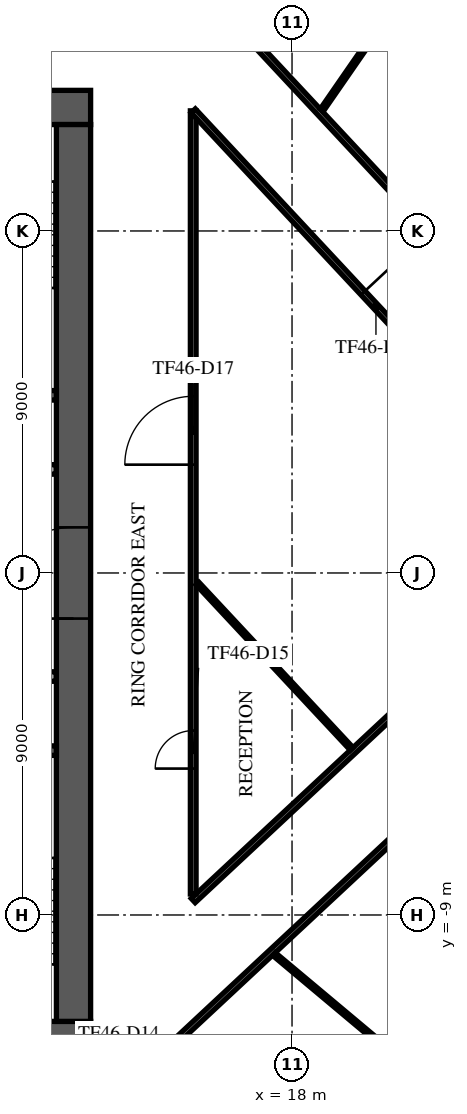
"""IFC4 building model, lengths in metres.
Left out: names, types, materials, properties, quantities, classifications, styles, units other than length and angle.
Written with IfcOpenShell. Run it as: python <this file> out.ifc"""

import sys

from ifc_helpers import new_model, si_unit, direction, frame, frame_2d, origin, place, context, subcontext, project, spatial, rectangle, extrude, element, fill, save


model = new_model("IFC4")
c1 = context("Model", 3, precision=1e-05, world=origin(), true_north=direction((0.0, 1.0)))
c2 = subcontext(c1, "Body", "Model", "MODEL_VIEW")
j1 = project(units=[si_unit("LENGTHUNIT", "METRE"), si_unit("PLANEANGLEUNIT", "RADIAN")], contexts=[c1])
p1 = place(None, origin())
s1 = spatial("IfcSite", under=j1, at=p1, CompositionType="ELEMENT")
p2 = place(p1, origin())
s2 = spatial("IfcBuilding", under=s1, at=p2, CompositionType="ELEMENT")
p3 = place(p2, frame((0.0, 0.0, 197.3)))
s3 = spatial("IfcBuildingStorey", under=s2, at=p3, CompositionType="ELEMENT", Elevation=197.3)
p4 = place(p3, frame((-12.7, 12.25, 0.0), z_axis=(0.0, 0.0, 1.0), x_axis=(1.0, 0.0, 0.0)))
e1 = element("IfcWall", 1, at=p4, inside=s3, PredefinedType="SHEAR", context=c2, shape_type="SweptSolid", body=[
    extrude(rectangle(XDim=25.4, YDim=0.9, at=frame_2d((12.7, 0.0))), origin(), (0.0, 0.0, 1.0), 3.62),
])
p5 = place(p4, frame((11.5, 0.0, 0.0)))
e2 = element("IfcOpeningElement", 2, at=p5, cuts=e1, PredefinedType="OPENING", context=c2, shape_type="SweptSolid", body=[
    extrude(rectangle(XDim=2.4, YDim=2.4, at=frame_2d((1.2, 1.2))), frame((0.0, 0.46, 0.0), z_axis=(0.0, -1.0, 0.0), x_axis=(1.0, 0.0, 0.0)), (0.0, 0.0, 1.0), 0.92),
])
p6 = place(p4, frame((22.325, 0.0, 0.0)))
e3 = element("IfcOpeningElement", 3, at=p6, cuts=e1, PredefinedType="OPENING", context=c2, shape_type="SweptSolid", body=[
    extrude(rectangle(XDim=1.2, YDim=2.1, at=frame_2d((0.6, 1.05))), frame((0.0, 0.46, 0.0), z_axis=(0.0, -1.0, 0.0), x_axis=(1.0, 0.0, 0.0)), (0.0, 0.0, 1.0), 0.92),
])
p7 = place(p4, frame((1.3, 0.0, 0.0)))
e4 = element("IfcOpeningElement", 4, at=p7, cuts=e1, PredefinedType="OPENING", context=c2, shape_type="SweptSolid", body=[
    extrude(rectangle(XDim=1.0, YDim=2.1, at=frame_2d((0.5, 1.05))), frame((0.0, 0.46, 0.0), z_axis=(0.0, -1.0, 0.0), x_axis=(1.0, 0.0, 0.0)), (0.0, 0.0, 1.0), 0.92),
])
p8 = place(p3, frame((-12.7, -12.25, 0.0), z_axis=(0.0, 0.0, 1.0), x_axis=(1.0, 0.0, 0.0)))
e5 = element("IfcWall", 5, at=p8, inside=s3, PredefinedType="SHEAR", context=c2, shape_type="SweptSolid", body=[
    extrude(rectangle(XDim=25.4, YDim=0.9, at=frame_2d((12.7, 0.0))), origin(), (0.0, 0.0, 1.0), 3.62),
])
p9 = place(p8, frame((7.6, 0.0, 0.0)))
e6 = element("IfcOpeningElement", 6, at=p9, cuts=e5, PredefinedType="OPENING", context=c2, shape_type="SweptSolid", body=[
    extrude(rectangle(XDim=2.0, YDim=2.1, at=frame_2d((1.0, 1.05))), frame((0.0, 0.46, 0.0), z_axis=(0.0, -1.0, 0.0), x_axis=(1.0, 0.0, 0.0)), (0.0, 0.0, 1.0), 0.92),
])
p10 = place(p8, frame((17.725, 0.0, 0.0)))
e7 = element("IfcOpeningElement", 7, at=p10, cuts=e5, PredefinedType="OPENING", context=c2, shape_type="SweptSolid", body=[
    extrude(rectangle(XDim=1.2, YDim=2.1, at=frame_2d((0.6, 1.05))), frame((0.0, 0.46, 0.0), z_axis=(0.0, -1.0, 0.0), x_axis=(1.0, 0.0, 0.0)), (0.0, 0.0, 1.0), 0.92),
])
p11 = place(p8, frame((1.875, 0.0, 0.0)))
e8 = element("IfcOpeningElement", 8, at=p11, cuts=e5, PredefinedType="OPENING", context=c2, shape_type="SweptSolid", body=[
    extrude(rectangle(XDim=1.2, YDim=2.1, at=frame_2d((0.6, 1.05))), frame((0.0, 0.46, 0.0), z_axis=(0.0, -1.0, 0.0), x_axis=(1.0, 0.0, 0.0)), (0.0, 0.0, 1.0), 0.92),
])
p12 = place(p8, frame((22.325, 0.0, 0.0)))
e9 = element("IfcOpeningElement", 9, at=p12, cuts=e5, PredefinedType="OPENING", context=c2, shape_type="SweptSolid", body=[
    extrude(rectangle(XDim=1.2, YDim=2.1, at=frame_2d((0.6, 1.05))), frame((0.0, 0.46, 0.0), z_axis=(0.0, -1.0, 0.0), x_axis=(1.0, 0.0, 0.0)), (0.0, 0.0, 1.0), 0.92),
])
p13 = place(p3, frame((12.25, -11.8, 0.0), z_axis=(0.0, 0.0, 1.0), x_axis=(0.0, 1.0, 0.0)))
e10 = element("IfcWall", 10, at=p13, inside=s3, PredefinedType="SHEAR", context=c2, shape_type="SweptSolid", body=[
    extrude(rectangle(XDim=23.6, YDim=0.9, at=frame_2d((11.8, 0.0))), origin(), (0.0, 0.0, 1.0), 3.62),
])
p14 = place(p13, frame((10.6, 0.0, 0.0)))
e11 = element("IfcOpeningElement", 11, at=p14, cuts=e10, PredefinedType="OPENING", context=c2, shape_type="SweptSolid", body=[
    extrude(rectangle(XDim=2.4, YDim=2.4, at=frame_2d((1.2, 1.2))), frame((0.0, 0.46, 0.0), z_axis=(0.0, -1.0, 0.0), x_axis=(1.0, 0.0, 0.0)), (0.0, 0.0, 1.0), 0.92),
])
for number, where, z_axis, x_axis in (
    (12, (8.65, 4.675, 0.0), (0.0, 0.0, 1.0), (1.0, 0.0, 0.0)),
    (13, (8.65, -4.675, 0.0), (0.0, 0.0, 1.0), (1.0, 0.0, 0.0)),
):
    element("IfcWall", number, at=place(p3, frame(where, z_axis=z_axis, x_axis=x_axis)), inside=s3, PredefinedType="SOLIDWALL", context=c2, shape_type="SweptSolid", body=[
        extrude(rectangle(XDim=3.15, YDim=0.25, at=frame_2d((1.575, 0.0))), origin(), (0.0, 0.0, 1.0), 3.62),
    ])
p15 = place(p3, frame((5.63, -2.725, 0.0), z_axis=(0.0, 0.0, 1.0), x_axis=(1.0, 0.0, 0.0)))
e14 = element("IfcWall", 14, at=p15, inside=s3, PredefinedType="PARTITIONING", context=c2, shape_type="SweptSolid", body=[
    extrude(rectangle(XDim=6.165, YDim=0.25, at=frame_2d((3.083, 0.0))), origin(), (0.0, 0.0, 1.0), 3.62),
])
p16 = place(p15, frame((0.745, 0.0, 0.0)))
e15 = element("IfcOpeningElement", 15, at=p16, cuts=e14, PredefinedType="OPENING", context=c2, shape_type="SweptSolid", body=[
    extrude(rectangle(XDim=1.0, YDim=2.1, at=frame_2d((0.5, 1.05))), frame((0.0, 0.135, 0.0), z_axis=(0.0, -1.0, 0.0), x_axis=(1.0, 0.0, 0.0)), (0.0, 0.0, 1.0), 0.27),
])
p17 = place(p15, frame((3.92, 0.0, 0.0)))
e16 = element("IfcOpeningElement", 16, at=p17, cuts=e14, PredefinedType="OPENING", context=c2, shape_type="SweptSolid", body=[
    extrude(rectangle(XDim=0.9, YDim=2.1, at=frame_2d((0.45, 1.05))), frame((0.0, 0.135, 0.0), z_axis=(0.0, -1.0, 0.0), x_axis=(1.0, 0.0, 0.0)), (0.0, 0.0, 1.0), 0.27),
])
p18 = place(p3, frame((8.38, 2.725, 0.0), z_axis=(0.0, 0.0, 1.0), x_axis=(1.0, 0.0, 0.0)))
e17 = element("IfcWall", 17, at=p18, inside=s3, PredefinedType="PARTITIONING", context=c2, shape_type="SweptSolid", body=[
    extrude(rectangle(XDim=3.415, YDim=0.25, at=frame_2d((1.708, 0.0))), origin(), (0.0, 0.0, 1.0), 3.62),
])
p19 = place(p18, frame((1.17, 0.0, 0.0)))
e18 = element("IfcOpeningElement", 18, at=p19, cuts=e17, PredefinedType="OPENING", context=c2, shape_type="SweptSolid", body=[
    extrude(rectangle(XDim=0.9, YDim=2.1, at=frame_2d((0.45, 1.05))), frame((0.0, 0.135, 0.0), z_axis=(0.0, -1.0, 0.0), x_axis=(1.0, 0.0, 0.0)), (0.0, 0.0, 1.0), 0.27),
])
p20 = place(p3, frame((-1.073, -34.773, 0.0), z_axis=(0.0, 0.0, 1.0), x_axis=(0.731351780381, 0.682000420333, 0.0)))
e19 = element("IfcWall", 19, at=p20, inside=s3, PredefinedType="STANDARD", context=c2, shape_type="SweptSolid", body=[
    extrude(rectangle(XDim=49.0, YDim=0.6, at=frame_2d((24.5, 0.0))), origin(), (0.0, 0.0, 1.0), 3.62),
])
p21 = place(p20, frame((1.227, 0.0, 0.9)))
e20 = element("IfcOpeningElement", 20, at=p21, cuts=e19, PredefinedType="OPENING", context=c2, shape_type="SweptSolid", body=[
    extrude(rectangle(XDim=2.0, YDim=2.1, at=frame_2d((1.0, 1.05))), frame((0.0, 0.31, 0.0), z_axis=(0.0, -1.0, 0.0), x_axis=(1.0, 0.0, 0.0)), (0.0, 0.0, 1.0), 0.62),
])
p22 = place(p20, frame((5.682, 0.0, 0.9)))
e21 = element("IfcOpeningElement", 21, at=p22, cuts=e19, PredefinedType="OPENING", context=c2, shape_type="SweptSolid", body=[
    extrude(rectangle(XDim=2.0, YDim=2.1, at=frame_2d((1.0, 1.05))), frame((0.0, 0.31, 0.0), z_axis=(0.0, -1.0, 0.0), x_axis=(1.0, 0.0, 0.0)), (0.0, 0.0, 1.0), 0.62),
])
p23 = place(p20, frame((14.591, 0.0, 0.9)))
e22 = element("IfcOpeningElement", 22, at=p23, cuts=e19, PredefinedType="OPENING", context=c2, shape_type="SweptSolid", body=[
    extrude(rectangle(XDim=2.0, YDim=2.1, at=frame_2d((1.0, 1.05))), frame((0.0, 0.31, 0.0), z_axis=(0.0, -1.0, 0.0), x_axis=(1.0, 0.0, 0.0)), (0.0, 0.0, 1.0), 0.62),
])
p24 = place(p20, frame((19.045, 0.0, 0.9)))
e23 = element("IfcOpeningElement", 23, at=p24, cuts=e19, PredefinedType="OPENING", context=c2, shape_type="SweptSolid", body=[
    extrude(rectangle(XDim=2.0, YDim=2.1, at=frame_2d((1.0, 1.05))), frame((0.0, 0.31, 0.0), z_axis=(0.0, -1.0, 0.0), x_axis=(1.0, 0.0, 0.0)), (0.0, 0.0, 1.0), 0.62),
])
p25 = place(p20, frame((23.5, 0.0, 0.9)))
e24 = element("IfcOpeningElement", 24, at=p25, cuts=e19, PredefinedType="OPENING", context=c2, shape_type="SweptSolid", body=[
    extrude(rectangle(XDim=2.0, YDim=2.1, at=frame_2d((1.0, 1.05))), frame((0.0, 0.31, 0.0), z_axis=(0.0, -1.0, 0.0), x_axis=(1.0, 0.0, 0.0)), (0.0, 0.0, 1.0), 0.62),
])
p26 = place(p20, frame((27.955, 0.0, 0.9)))
e25 = element("IfcOpeningElement", 25, at=p26, cuts=e19, PredefinedType="OPENING", context=c2, shape_type="SweptSolid", body=[
    extrude(rectangle(XDim=2.0, YDim=2.1, at=frame_2d((1.0, 1.05))), frame((0.0, 0.31, 0.0), z_axis=(0.0, -1.0, 0.0), x_axis=(1.0, 0.0, 0.0)), (0.0, 0.0, 1.0), 0.62),
])
p27 = place(p20, frame((32.409, 0.0, 0.9)))
e26 = element("IfcOpeningElement", 26, at=p27, cuts=e19, PredefinedType="OPENING", context=c2, shape_type="SweptSolid", body=[
    extrude(rectangle(XDim=2.0, YDim=2.1, at=frame_2d((1.0, 1.05))), frame((0.0, 0.31, 0.0), z_axis=(0.0, -1.0, 0.0), x_axis=(1.0, 0.0, 0.0)), (0.0, 0.0, 1.0), 0.62),
])
p28 = place(p20, frame((36.864, 0.0, 0.9)))
e27 = element("IfcOpeningElement", 27, at=p28, cuts=e19, PredefinedType="OPENING", context=c2, shape_type="SweptSolid", body=[
    extrude(rectangle(XDim=2.0, YDim=2.1, at=frame_2d((1.0, 1.05))), frame((0.0, 0.31, 0.0), z_axis=(0.0, -1.0, 0.0), x_axis=(1.0, 0.0, 0.0)), (0.0, 0.0, 1.0), 0.62),
])
p29 = place(p20, frame((41.318, 0.0, 0.9)))
e28 = element("IfcOpeningElement", 28, at=p29, cuts=e19, PredefinedType="OPENING", context=c2, shape_type="SweptSolid", body=[
    extrude(rectangle(XDim=2.0, YDim=2.1, at=frame_2d((1.0, 1.05))), frame((0.0, 0.31, 0.0), z_axis=(0.0, -1.0, 0.0), x_axis=(1.0, 0.0, 0.0)), (0.0, 0.0, 1.0), 0.62),
])
p30 = place(p20, frame((45.773, 0.0, 0.9)))
e29 = element("IfcOpeningElement", 29, at=p30, cuts=e19, PredefinedType="OPENING", context=c2, shape_type="SweptSolid", body=[
    extrude(rectangle(XDim=2.0, YDim=2.1, at=frame_2d((1.0, 1.05))), frame((0.0, 0.31, 0.0), z_axis=(0.0, -1.0, 0.0), x_axis=(1.0, 0.0, 0.0)), (0.0, 0.0, 1.0), 0.62),
])
p31 = place(p3, frame((35.02, 5.994, 0.0), z_axis=(0.0, 0.0, 1.0), x_axis=(-0.682002361324, 0.731349970362, 0.0)))
e30 = element("IfcWall", 30, at=p31, inside=s3, PredefinedType="STANDARD", context=c2, shape_type="SweptSolid", body=[
    extrude(rectangle(XDim=39.0, YDim=0.6, at=frame_2d((19.5, 0.0))), origin(), (0.0, 0.0, 1.0), 3.62),
])
p32 = place(p31, frame((1.217, 0.0, 0.9)))
e31 = element("IfcOpeningElement", 31, at=p32, cuts=e30, PredefinedType="OPENING", context=c2, shape_type="SweptSolid", body=[
    extrude(rectangle(XDim=1.9, YDim=2.1, at=frame_2d((0.95, 1.05))), frame((0.0, 0.31, 0.0), z_axis=(0.0, -1.0, 0.0), x_axis=(1.0, 0.0, 0.0)), (0.0, 0.0, 1.0), 0.62),
])
p33 = place(p31, frame((5.55, 0.0, 0.9)))
e32 = element("IfcOpeningElement", 32, at=p33, cuts=e30, PredefinedType="OPENING", context=c2, shape_type="SweptSolid", body=[
    extrude(rectangle(XDim=1.9, YDim=2.1, at=frame_2d((0.95, 1.05))), frame((0.0, 0.31, 0.0), z_axis=(0.0, -1.0, 0.0), x_axis=(1.0, 0.0, 0.0)), (0.0, 0.0, 1.0), 0.62),
])
p34 = place(p31, frame((9.883, 0.0, 0.9)))
e33 = element("IfcOpeningElement", 33, at=p34, cuts=e30, PredefinedType="OPENING", context=c2, shape_type="SweptSolid", body=[
    extrude(rectangle(XDim=1.9, YDim=2.1, at=frame_2d((0.95, 1.05))), frame((0.0, 0.31, 0.0), z_axis=(0.0, -1.0, 0.0), x_axis=(1.0, 0.0, 0.0)), (0.0, 0.0, 1.0), 0.62),
])
p35 = place(p31, frame((14.217, 0.0, 0.9)))
e34 = element("IfcOpeningElement", 34, at=p35, cuts=e30, PredefinedType="OPENING", context=c2, shape_type="SweptSolid", body=[
    extrude(rectangle(XDim=1.9, YDim=2.1, at=frame_2d((0.95, 1.05))), frame((0.0, 0.31, 0.0), z_axis=(0.0, -1.0, 0.0), x_axis=(1.0, 0.0, 0.0)), (0.0, 0.0, 1.0), 0.62),
])
p36 = place(p31, frame((18.55, 0.0, 0.9)))
e35 = element("IfcOpeningElement", 35, at=p36, cuts=e30, PredefinedType="OPENING", context=c2, shape_type="SweptSolid", body=[
    extrude(rectangle(XDim=1.9, YDim=2.1, at=frame_2d((0.95, 1.05))), frame((0.0, 0.31, 0.0), z_axis=(0.0, -1.0, 0.0), x_axis=(1.0, 0.0, 0.0)), (0.0, 0.0, 1.0), 0.62),
])
p37 = place(p31, frame((22.883, 0.0, 0.9)))
e36 = element("IfcOpeningElement", 36, at=p37, cuts=e30, PredefinedType="OPENING", context=c2, shape_type="SweptSolid", body=[
    extrude(rectangle(XDim=1.9, YDim=2.1, at=frame_2d((0.95, 1.05))), frame((0.0, 0.31, 0.0), z_axis=(0.0, -1.0, 0.0), x_axis=(1.0, 0.0, 0.0)), (0.0, 0.0, 1.0), 0.62),
])
p38 = place(p31, frame((27.217, 0.0, 0.9)))
e37 = element("IfcOpeningElement", 37, at=p38, cuts=e30, PredefinedType="OPENING", context=c2, shape_type="SweptSolid", body=[
    extrude(rectangle(XDim=1.9, YDim=2.1, at=frame_2d((0.95, 1.05))), frame((0.0, 0.31, 0.0), z_axis=(0.0, -1.0, 0.0), x_axis=(1.0, 0.0, 0.0)), (0.0, 0.0, 1.0), 0.62),
])
p39 = place(p31, frame((31.55, 0.0, 0.9)))
e38 = element("IfcOpeningElement", 38, at=p39, cuts=e30, PredefinedType="OPENING", context=c2, shape_type="SweptSolid", body=[
    extrude(rectangle(XDim=1.9, YDim=2.1, at=frame_2d((0.95, 1.05))), frame((0.0, 0.31, 0.0), z_axis=(0.0, -1.0, 0.0), x_axis=(1.0, 0.0, 0.0)), (0.0, 0.0, 1.0), 0.62),
])
p40 = place(p31, frame((35.883, 0.0, 0.9)))
e39 = element("IfcOpeningElement", 39, at=p40, cuts=e30, PredefinedType="OPENING", context=c2, shape_type="SweptSolid", body=[
    extrude(rectangle(XDim=1.9, YDim=2.1, at=frame_2d((0.95, 1.05))), frame((0.0, 0.31, 0.0), z_axis=(0.0, -1.0, 0.0), x_axis=(1.0, 0.0, 0.0)), (0.0, 0.0, 1.0), 0.62),
])
p41 = place(p3, frame((1.576, -24.793, 0.0), z_axis=(0.0, 0.0, 1.0), x_axis=(0.731351215564, 0.68200102602, 0.0)))
e40 = element("IfcWall", 40, at=p41, inside=s3, PredefinedType="PARTITIONING", context=c2, shape_type="SweptSolid", body=[
    extrude(rectangle(XDim=31.513, YDim=0.15, at=frame_2d((15.757, 0.0))), origin(), (0.0, 0.0, 1.0), 3.17),
])
p42 = place(p41, frame((2.3, 0.0, 0.0)))
e41 = element("IfcOpeningElement", 41, at=p42, cuts=e40, PredefinedType="OPENING", context=c2, shape_type="SweptSolid", body=[
    extrude(rectangle(XDim=1.8, YDim=2.1, at=frame_2d((0.9, 1.05))), frame((0.0, 0.085, 0.0), z_axis=(0.0, -1.0, 0.0), x_axis=(1.0, 0.0, 0.0)), (0.0, 0.0, 1.0), 0.17),
])
p43 = place(p41, frame((11.883, 0.0, 0.0)))
e42 = element("IfcOpeningElement", 42, at=p43, cuts=e40, PredefinedType="OPENING", context=c2, shape_type="SweptSolid", body=[
    extrude(rectangle(XDim=1.0, YDim=2.1, at=frame_2d((0.5, 1.05))), frame((0.0, 0.085, 0.0), z_axis=(0.0, -1.0, 0.0), x_axis=(1.0, 0.0, 0.0)), (0.0, 0.0, 1.0), 0.17),
])
p44 = place(p41, frame((15.726, 0.0, 0.0)))
e43 = element("IfcOpeningElement", 43, at=p44, cuts=e40, PredefinedType="OPENING", context=c2, shape_type="SweptSolid", body=[
    extrude(rectangle(XDim=1.0, YDim=2.1, at=frame_2d((0.5, 1.05))), frame((0.0, 0.085, 0.0), z_axis=(0.0, -1.0, 0.0), x_axis=(1.0, 0.0, 0.0)), (0.0, 0.0, 1.0), 0.17),
])
p45 = place(p3, frame((8.535, 23.042, 0.0), z_axis=(0.0, 0.0, 1.0), x_axis=(0.68201130552, -0.73134162957, 0.0)))
e44 = element("IfcWall", 44, at=p45, inside=s3, PredefinedType="PARTITIONING", context=c2, shape_type="SweptSolid", body=[
    extrude(rectangle(XDim=22.137, YDim=0.15, at=frame_2d((11.069, 0.0))), origin(), (0.0, 0.0, 1.0), 3.17),
])
p46 = place(p45, frame((1.55, 0.0, 0.0)))
e45 = element("IfcOpeningElement", 45, at=p46, cuts=e44, PredefinedType="OPENING", context=c2, shape_type="SweptSolid", body=[
    extrude(rectangle(XDim=1.0, YDim=2.1, at=frame_2d((0.5, 1.05))), frame((0.0, 0.085, 0.0), z_axis=(0.0, -1.0, 0.0), x_axis=(1.0, 0.0, 0.0)), (0.0, 0.0, 1.0), 0.17),
])
p47 = place(p45, frame((8.485, 0.0, 0.0)))
e46 = element("IfcOpeningElement", 46, at=p47, cuts=e44, PredefinedType="OPENING", context=c2, shape_type="SweptSolid", body=[
    extrude(rectangle(XDim=1.0, YDim=2.1, at=frame_2d((0.5, 1.05))), frame((0.0, 0.085, 0.0), z_axis=(0.0, -1.0, 0.0), x_axis=(1.0, 0.0, 0.0)), (0.0, 0.0, 1.0), 0.17),
])
p48 = place(p3, frame((15.4, -8.62, 0.0), z_axis=(0.0, 0.0, 1.0), x_axis=(0.731354186133, 0.681997840485, 0.0)))
e47 = element("IfcWall", 47, at=p48, inside=s3, PredefinedType="PARTITIONING", context=c2, shape_type="SweptSolid", body=[
    extrude(rectangle(XDim=10.373, YDim=0.15, at=frame_2d((5.187, 0.0))), origin(), (0.0, 0.0, 1.0), 3.17),
])
p49 = place(p3, frame((15.4, -8.448, 0.0), z_axis=(0.0, 0.0, 1.0), x_axis=(0.0, 1.0, 0.0)))
e48 = element("IfcWall", 48, at=p49, inside=s3, PredefinedType="PARTITIONING", context=c2, shape_type="SweptSolid", body=[
    extrude(rectangle(XDim=20.608, YDim=0.15, at=frame_2d((10.304, 0.0))), origin(), (0.0, 0.0, 1.0), 3.17),
])
p50 = place(p49, frame((3.3, 0.0, 0.0)))
e49 = element("IfcOpeningElement", 49, at=p50, cuts=e48, PredefinedType="OPENING", context=c2, shape_type="SweptSolid", body=[
    extrude(rectangle(XDim=1.0, YDim=2.1, at=frame_2d((0.5, 1.05))), frame((0.0, 0.085, 0.0), z_axis=(0.0, -1.0, 0.0), x_axis=(1.0, 0.0, 0.0)), (0.0, 0.0, 1.0), 0.17),
])
p51 = place(p49, frame((11.298, 0.0, 0.0)))
e50 = element("IfcOpeningElement", 50, at=p51, cuts=e48, PredefinedType="OPENING", context=c2, shape_type="SweptSolid", body=[
    extrude(rectangle(XDim=1.8, YDim=2.1, at=frame_2d((0.9, 1.05))), frame((0.0, 0.085, 0.0), z_axis=(0.0, -1.0, 0.0), x_axis=(1.0, 0.0, 0.0)), (0.0, 0.0, 1.0), 0.17),
])
p52 = place(p3, frame((15.4, 12.162, 0.0), z_axis=(0.0, 0.0, 1.0), x_axis=(0.681988505996, -0.73136289056, 0.0)))
e51 = element("IfcWall", 51, at=p52, inside=s3, PredefinedType="PARTITIONING", context=c2, shape_type="SweptSolid", body=[
    extrude(rectangle(XDim=9.499, YDim=0.15, at=frame_2d((4.75, 0.0))), origin(), (0.0, 0.0, 1.0), 3.17),
])
p53 = place(p52, frame((6.551, 0.0, 0.0)))
e52 = element("IfcOpeningElement", 52, at=p53, cuts=e51, PredefinedType="OPENING", context=c2, shape_type="SweptSolid", body=[
    extrude(rectangle(XDim=1.0, YDim=2.1, at=frame_2d((0.5, 1.05))), frame((0.0, 0.085, 0.0), z_axis=(0.0, -1.0, 0.0), x_axis=(1.0, 0.0, 0.0)), (0.0, 0.0, 1.0), 0.17),
])
p54 = place(p3, frame((15.512, -0.277, 0.0), z_axis=(0.0, 0.0, 1.0), x_axis=(0.681935181867, -0.731412611138, 0.0)))
e53 = element("IfcWall", 53, at=p54, inside=s3, PredefinedType="PARTITIONING", context=c2, shape_type="SweptSolid", body=[
    extrude(rectangle(XDim=5.951, YDim=0.1, at=frame_2d((2.976, 0.0))), origin(), (0.0, 0.0, 1.0), 3.17),
])
p55 = place(p3, frame((17.527, -10.03, 0.0), z_axis=(0.0, 0.0, 1.0), x_axis=(0.76649272058, -0.642252994775, 0.0)))
e54 = element("IfcWall", 54, at=p55, inside=s3, PredefinedType="PARTITIONING", context=c2, shape_type="SweptSolid", body=[
    extrude(rectangle(XDim=5.148, YDim=0.1, at=frame_2d((2.574, 0.0))), origin(), (0.0, 0.0, 1.0), 2.97),
])
p56 = place(p3, frame((18.783, 12.179, 0.0), z_axis=(0.0, 0.0, 1.0), x_axis=(0.568978927241, 0.822352102421, 0.0)))
e55 = element("IfcWall", 55, at=p56, inside=s3, PredefinedType="PARTITIONING", context=c2, shape_type="SweptSolid", body=[
    extrude(rectangle(XDim=7.528, YDim=0.1, at=frame_2d((3.764, 0.0))), origin(), (0.0, 0.0, 1.0), 2.97),
])
p57 = place(p14, origin())
e56 = element("IfcDoor", 56, at=p57, inside=s3, OperationType="SINGLE_SWING_LEFT", PredefinedType="DOOR", context=c2, shape_type="SweptSolid", body=[
    extrude(rectangle(XDim=2.4, YDim=2.4, at=frame_2d((1.2, 1.2))), frame((0.0, 0.025, 0.0), z_axis=(0.0, -1.0, 0.0), x_axis=(1.0, 0.0, 0.0)), (0.0, 0.0, 1.0), 0.05),
])
fill(e11, e56)
p58 = place(p50, frame((1.0, 0.0, 0.0), z_axis=(0.0, 0.0, 1.0), x_axis=(-1.0, 0.0, 0.0)))
e57 = element("IfcDoor", 57, at=p58, inside=s3, OperationType="SINGLE_SWING_RIGHT", PredefinedType="DOOR", context=c2, shape_type="SweptSolid", body=[
    extrude(rectangle(XDim=1.0, YDim=2.1, at=frame_2d((0.5, 1.05))), frame((0.0, 0.025, 0.0), z_axis=(0.0, -1.0, 0.0), x_axis=(1.0, 0.0, 0.0)), (0.0, 0.0, 1.0), 0.05),
])
fill(e49, e57)
p59 = place(p51, frame((1.8, 0.0, 0.0), z_axis=(0.0, 0.0, 1.0), x_axis=(-1.0, 0.0, 0.0)))
e58 = element("IfcDoor", 58, at=p59, inside=s3, OperationType="DOUBLE_DOOR_SINGLE_SWING", PredefinedType="DOOR", context=c2, shape_type="SweptSolid", body=[
    extrude(rectangle(XDim=1.8, YDim=2.1, at=frame_2d((0.9, 1.05))), frame((0.0, 0.025, 0.0), z_axis=(0.0, -1.0, 0.0), x_axis=(1.0, 0.0, 0.0)), (0.0, 0.0, 1.0), 0.05),
])
fill(e50, e58)
p60 = place(p53, frame((1.0, 0.0, 0.0), z_axis=(0.0, 0.0, 1.0), x_axis=(-1.0, 0.0, 0.0)))
e59 = element("IfcDoor", 59, at=p60, inside=s3, OperationType="SINGLE_SWING_RIGHT", PredefinedType="DOOR", context=c2, shape_type="SweptSolid", body=[
    extrude(rectangle(XDim=1.0, YDim=2.1, at=frame_2d((0.5, 1.05))), frame((0.0, 0.025, 0.0), z_axis=(0.0, -1.0, 0.0), x_axis=(1.0, 0.0, 0.0)), (0.0, 0.0, 1.0), 0.05),
])
fill(e52, e59)
save(model, sys.argv[1])
